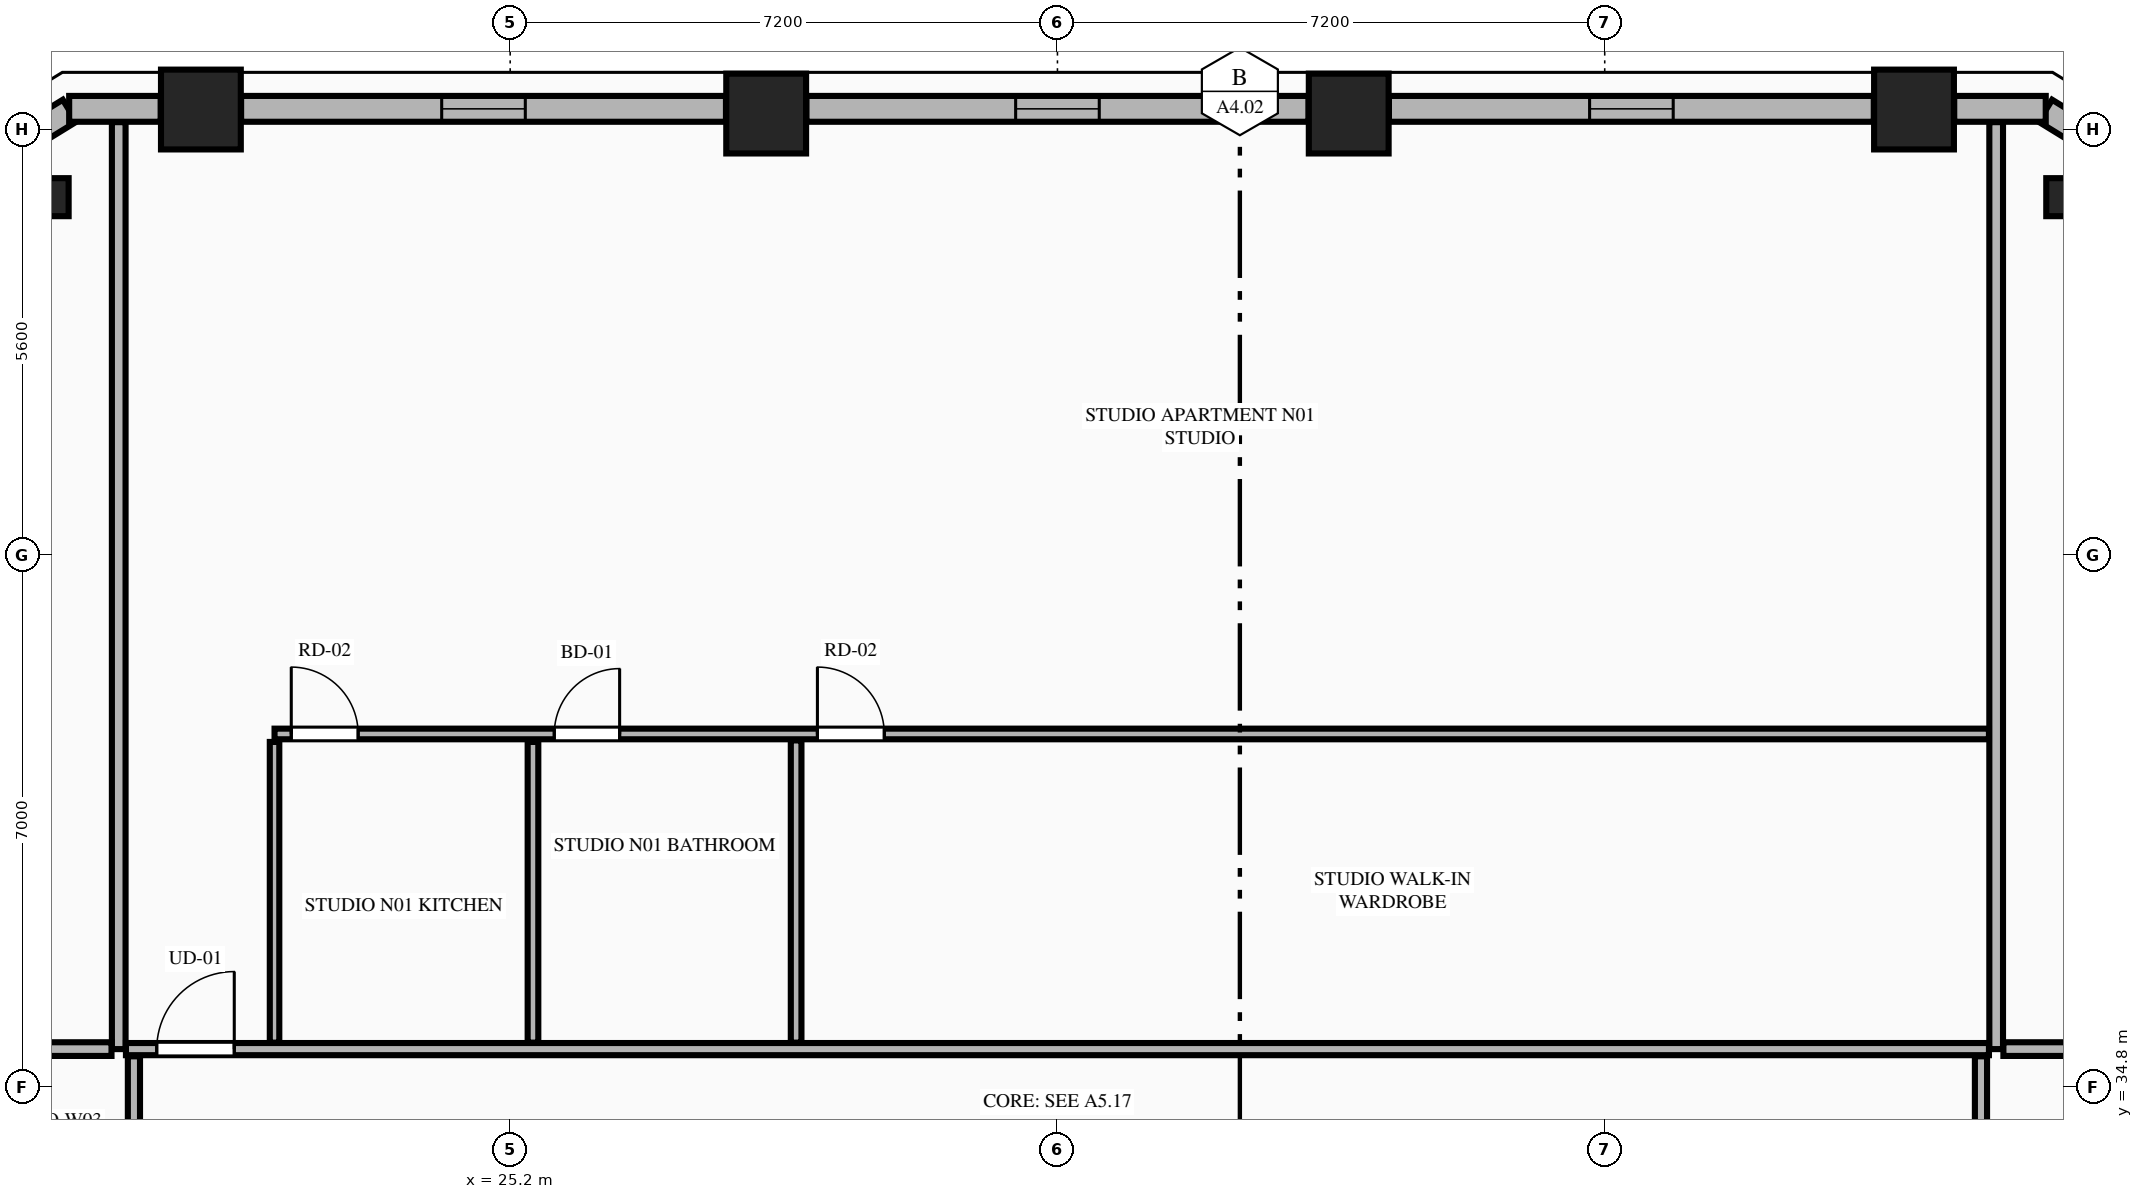
"""IFC4 building model, lengths in metres.
Left out: names, types, materials, properties, quantities, classifications, styles, units other than length and angle.
Written with IfcOpenShell. Run it as: python <this file> out.ifc"""

import sys

from ifc_helpers import new_model, si_unit, direction, frame, frame_2d, origin, origin_2d, place, context, subcontext, project, spatial, rectangle, extrude, element, fill, save


model = new_model("IFC4")
c1 = context("Model", 3, precision=1e-05, world=origin(), true_north=direction((0.0, 1.0)))
c2 = subcontext(c1, "Body", "Model", "MODEL_VIEW")
j1 = project(units=[si_unit("LENGTHUNIT", "METRE"), si_unit("PLANEANGLEUNIT", "RADIAN")], contexts=[c1])
p1 = place(None, origin())
s1 = spatial("IfcSite", under=j1, at=p1, CompositionType="ELEMENT")
p2 = place(p1, origin())
s2 = spatial("IfcBuilding", under=s1, at=p2, CompositionType="ELEMENT")
p3 = place(p2, frame((0.0, 0.0, 123.25)))
s3 = spatial("IfcBuildingStorey", under=s2, at=p3, CompositionType="ELEMENT", Elevation=123.25)
for number, where, z_axis, x_axis in (
    (1, (43.669, 47.661, 0.0), (0.0, 0.0, 1.0), (1.0, 0.0, 0.0)),
    (2, (36.232, 47.608, 0.0), (0.0, 0.0, 1.0), (1.0, 0.0, 0.0)),
    (3, (28.568, 47.608, 0.0), (0.0, 0.0, 1.0), (1.0, 0.0, 0.0)),
    (4, (21.131, 47.661, 0.0), (0.0, 0.0, 1.0), (1.0, 0.0, 0.0)),
):
    element("IfcColumn", number, at=place(p3, frame(where, z_axis=z_axis, x_axis=x_axis)), inside=s3, PredefinedType="COLUMN", context=c2, shape_type="SweptSolid", body=[
        extrude(rectangle(XDim=1.05, YDim=1.05, at=origin_2d()), origin(), (0.0, 0.0, 1.0), 3.55),
    ])
for number, where, z_axis, x_axis in (
    (5, (45.659, 46.508, 0.0), (0.0, 0.0, 1.0), (-0.865, 0.501, 0.0)),
    (6, (19.141, 46.508, 0.0), (0.0, 0.0, 1.0), (-0.865, -0.501, 0.0)),
):
    element("IfcColumn", number, at=place(p3, frame(where, z_axis=z_axis, x_axis=x_axis)), inside=s3, PredefinedType="PILASTER", context=c2, shape_type="SweptSolid", body=[
        extrude(rectangle(XDim=0.5, YDim=0.35, at=origin_2d()), origin(), (0.0, 0.0, 1.0), 3.55),
    ])
for number, where, z_axis, x_axis in (
    (7, (46.971, 46.677, 0.0), (0.0, 0.0, 1.0), (-0.852, 0.524, 0.0)),
    (8, (19.403, 47.645, 0.0), (0.0, 0.0, 1.0), (-0.852, -0.524, 0.0)),
):
    element("IfcWall", number, at=place(p3, frame(where, z_axis=z_axis, x_axis=x_axis)), inside=s3, PredefinedType="STANDARD", context=c2, shape_type="SweptSolid", body=[
        extrude(rectangle(XDim=1.848, YDim=0.34, at=frame_2d((0.924, 0.0))), origin(), (0.0, 0.0, 1.0), 3.34),
    ])
p4 = place(p3, frame((45.402, 47.67, 0.0), z_axis=(0.0, 0.0, 1.0), x_axis=(-1.0, 0.0, 0.0)))
e9 = element("IfcWall", 9, at=p4, inside=s3, PredefinedType="STANDARD", context=c2, shape_type="SweptSolid", body=[
    extrude(rectangle(XDim=1.204, YDim=0.34, at=frame_2d((0.602, 0.0))), origin(), (0.0, 0.0, 1.0), 3.34),
])
p5 = place(p3, frame((43.14, 47.67, 0.0), z_axis=(0.0, 0.0, 1.0), x_axis=(-1.0, 0.0, 0.0)))
e10 = element("IfcWall", 10, at=p5, inside=s3, PredefinedType="STANDARD", context=c2, shape_type="SweptSolid", body=[
    extrude(rectangle(XDim=6.379, YDim=0.34, at=frame_2d((3.189, 0.0))), origin(), (0.0, 0.0, 1.0), 2.797),
])
p6 = place(p5, frame((2.639, 0.0, 0.75)))
e11 = element("IfcOpeningElement", 11, at=p6, cuts=e10, PredefinedType="OPENING", context=c2, shape_type="SweptSolid", body=[
    extrude(rectangle(XDim=1.1, YDim=1.897, at=frame_2d((0.55, 0.948))), frame((0.0, 0.18, 0.0), z_axis=(0.0, -1.0, 0.0), x_axis=(1.0, 0.0, 0.0)), (0.0, 0.0, 1.0), 0.36),
])
p7 = place(p3, frame((35.703, 47.67, 0.0), z_axis=(0.0, 0.0, 1.0), x_axis=(-1.0, 0.0, 0.0)))
e12 = element("IfcWall", 12, at=p7, inside=s3, PredefinedType="STANDARD", context=c2, shape_type="SweptSolid", body=[
    extrude(rectangle(XDim=6.606, YDim=0.34, at=frame_2d((3.303, 0.0))), origin(), (0.0, 0.0, 1.0), 2.797),
])
p8 = place(p7, frame((2.753, 0.0, 0.75)))
e13 = element("IfcOpeningElement", 13, at=p8, cuts=e12, PredefinedType="OPENING", context=c2, shape_type="SweptSolid", body=[
    extrude(rectangle(XDim=1.1, YDim=1.897, at=frame_2d((0.55, 0.948))), frame((0.0, 0.18, 0.0), z_axis=(0.0, -1.0, 0.0), x_axis=(1.0, 0.0, 0.0)), (0.0, 0.0, 1.0), 0.36),
])
p9 = place(p3, frame((28.039, 47.67, 0.0), z_axis=(0.0, 0.0, 1.0), x_axis=(-1.0, 0.0, 0.0)))
e14 = element("IfcWall", 14, at=p9, inside=s3, PredefinedType="STANDARD", context=c2, shape_type="SweptSolid", body=[
    extrude(rectangle(XDim=6.379, YDim=0.34, at=frame_2d((3.189, 0.0))), origin(), (0.0, 0.0, 1.0), 2.797),
])
p10 = place(p9, frame((2.64, 0.0, 0.75)))
e15 = element("IfcOpeningElement", 15, at=p10, cuts=e14, PredefinedType="OPENING", context=c2, shape_type="SweptSolid", body=[
    extrude(rectangle(XDim=1.1, YDim=1.897, at=frame_2d((0.55, 0.948))), frame((0.0, 0.18, 0.0), z_axis=(0.0, -1.0, 0.0), x_axis=(1.0, 0.0, 0.0)), (0.0, 0.0, 1.0), 0.36),
])
p11 = place(p3, frame((20.602, 47.67, 0.0), z_axis=(0.0, 0.0, 1.0), x_axis=(-1.0, 0.0, 0.0)))
e16 = element("IfcWall", 16, at=p11, inside=s3, PredefinedType="STANDARD", context=c2, shape_type="SweptSolid", body=[
    extrude(rectangle(XDim=1.204, YDim=0.34, at=frame_2d((0.602, 0.0))), origin(), (0.0, 0.0, 1.0), 3.34),
])
for number, where, z_axis, x_axis in (
    (17, (20.05, 35.3, 0.0), (0.0, 0.0, 1.0), (0.0, 1.0, 0.0)),
    (18, (44.75, 35.3, 0.0), (0.0, 0.0, 1.0), (0.0, 1.0, 0.0)),
):
    element("IfcWall", number, at=place(p3, frame(where, z_axis=z_axis, x_axis=x_axis)), inside=s3, PredefinedType="PARTITIONING", context=c2, shape_type="SweptSolid", body=[
        extrude(rectangle(XDim=12.195, YDim=0.18, at=frame_2d((6.098, 0.0))), origin(), (0.0, 0.0, 1.0), 3.34),
    ])
p12 = place(p3, frame((20.145, 35.3, 0.0), z_axis=(0.0, 0.0, 1.0), x_axis=(1.0, 0.0, 0.0)))
e19 = element("IfcWall", 19, at=p12, inside=s3, PredefinedType="PARTITIONING", context=c2, shape_type="SweptSolid", body=[
    extrude(rectangle(XDim=24.51, YDim=0.16, at=frame_2d((12.255, 0.0))), origin(), (0.0, 0.0, 1.0), 3.34),
])
p13 = place(p12, frame((0.405, 0.0, 0.0)))
e20 = element("IfcOpeningElement", 20, at=p13, cuts=e19, PredefinedType="OPENING", context=c2, shape_type="SweptSolid", body=[
    extrude(rectangle(XDim=1.02, YDim=2.25, at=frame_2d((0.51, 1.125))), frame((0.0, 0.09, 0.0), z_axis=(0.0, -1.0, 0.0), x_axis=(1.0, 0.0, 0.0)), (0.0, 0.0, 1.0), 0.18),
])
p14 = place(p3, frame((22.1, 35.385, 0.0), z_axis=(0.0, 0.0, 1.0), x_axis=(0.0, 1.0, 0.0)))
e21 = element("IfcWall", 21, at=p14, inside=s3, PredefinedType="PARTITIONING", context=c2, shape_type="SweptSolid", body=[
    extrude(rectangle(XDim=3.956, YDim=0.125, at=frame_2d((1.978, 0.0))), origin(), (0.0, 0.0, 1.0), 2.722),
])
p15 = place(p3, frame((22.1, 39.446, 0.0), z_axis=(0.0, 0.0, 1.0), x_axis=(1.0, 0.0, 0.0)))
e22 = element("IfcWall", 22, at=p15, inside=s3, PredefinedType="PLUMBINGWALL", context=c2, shape_type="SweptSolid", body=[
    extrude(rectangle(XDim=22.555, YDim=0.14, at=frame_2d((11.277, 0.0))), origin(), (0.0, 0.0, 1.0), 3.34),
])
p16 = place(p15, frame((3.68, 0.0, 0.0)))
e23 = element("IfcOpeningElement", 23, at=p16, cuts=e22, PredefinedType="OPENING", context=c2, shape_type="SweptSolid", body=[
    extrude(rectangle(XDim=0.86, YDim=2.1, at=frame_2d((0.43, 1.05))), frame((0.0, 0.08, 0.0), z_axis=(0.0, -1.0, 0.0), x_axis=(1.0, 0.0, 0.0)), (0.0, 0.0, 1.0), 0.16),
])
p17 = place(p15, frame((7.142, 0.0, 0.0)))
e24 = element("IfcOpeningElement", 24, at=p17, cuts=e22, PredefinedType="OPENING", context=c2, shape_type="SweptSolid", body=[
    extrude(rectangle(XDim=0.88, YDim=2.15, at=frame_2d((0.44, 1.075))), frame((0.0, 0.08, 0.0), z_axis=(0.0, -1.0, 0.0), x_axis=(1.0, 0.0, 0.0)), (0.0, 0.0, 1.0), 0.16),
])
p18 = place(p15, frame((0.22, 0.0, 0.0)))
e25 = element("IfcOpeningElement", 25, at=p18, cuts=e22, PredefinedType="OPENING", context=c2, shape_type="SweptSolid", body=[
    extrude(rectangle(XDim=0.88, YDim=2.15, at=frame_2d((0.44, 1.075))), frame((0.0, 0.08, 0.0), z_axis=(0.0, -1.0, 0.0), x_axis=(1.0, 0.0, 0.0)), (0.0, 0.0, 1.0), 0.16),
])
p19 = place(p3, frame((25.5, 35.385, 0.0), z_axis=(0.0, 0.0, 1.0), x_axis=(0.0, 1.0, 0.0)))
e26 = element("IfcWall", 26, at=p19, inside=s3, PredefinedType="PLUMBINGWALL", context=c2, shape_type="SweptSolid", body=[
    extrude(rectangle(XDim=3.956, YDim=0.14, at=frame_2d((1.978, 0.0))), origin(), (0.0, 0.0, 1.0), 3.34),
])
p20 = place(p3, frame((28.962, 35.385, 0.0), z_axis=(0.0, 0.0, 1.0), x_axis=(0.0, 1.0, 0.0)))
e27 = element("IfcWall", 27, at=p20, inside=s3, PredefinedType="PLUMBINGWALL", context=c2, shape_type="SweptSolid", body=[
    extrude(rectangle(XDim=3.976, YDim=0.14, at=frame_2d((1.988, 0.0))), origin(), (0.0, 0.0, 1.0), 3.34),
])
p21 = place(p3, frame((12.286, 35.3, 0.0), z_axis=(0.0, 0.0, 1.0), x_axis=(1.0, 0.0, 0.0)))
e28 = element("IfcWall", 28, at=p21, inside=s3, PredefinedType="PARTITIONING", context=c2, shape_type="SweptSolid", body=[
    extrude(rectangle(XDim=7.669, YDim=0.18, at=frame_2d((3.834, 0.0))), origin(), (0.0, 0.0, 1.0), 3.34),
])
p22 = place(p3, frame((44.845, 35.3, 0.0), z_axis=(0.0, 0.0, 1.0), x_axis=(1.0, 0.0, 0.0)))
e29 = element("IfcWall", 29, at=p22, inside=s3, PredefinedType="PARTITIONING", context=c2, shape_type="SweptSolid", body=[
    extrude(rectangle(XDim=7.669, YDim=0.18, at=frame_2d((3.834, 0.0))), origin(), (0.0, 0.0, 1.0), 3.34),
])
p23 = place(p3, frame((20.25, 29.191, 0.0), z_axis=(0.0, 0.0, 1.0), x_axis=(0.0, 1.0, 0.0)))
e30 = element("IfcWall", 30, at=p23, inside=s3, PredefinedType="PARTITIONING", context=c2, shape_type="SweptSolid", body=[
    extrude(rectangle(XDim=6.014, YDim=0.16, at=frame_2d((3.007, 0.0))), origin(), (0.0, 0.0, 1.0), 3.34),
])
p24 = place(p23, frame((0.4, 0.0, 0.0)))
e31 = element("IfcOpeningElement", 31, at=p24, cuts=e30, PredefinedType="OPENING", context=c2, shape_type="SweptSolid", body=[
    extrude(rectangle(XDim=1.02, YDim=2.25, at=frame_2d((0.51, 1.125))), frame((0.0, 0.09, 0.0), z_axis=(0.0, -1.0, 0.0), x_axis=(1.0, 0.0, 0.0)), (0.0, 0.0, 1.0), 0.18),
])
p25 = place(p3, frame((44.55, 26.371, 0.0), z_axis=(0.0, 0.0, 1.0), x_axis=(0.0, 1.0, 0.0)))
e32 = element("IfcWall", 32, at=p25, inside=s3, PredefinedType="PARTITIONING", context=c2, shape_type="SweptSolid", body=[
    extrude(rectangle(XDim=8.834, YDim=0.16, at=frame_2d((4.417, 0.0))), origin(), (0.0, 0.0, 1.0), 3.34),
])
p26 = place(p25, frame((0.4, 0.0, 0.0)))
e33 = element("IfcOpeningElement", 33, at=p26, cuts=e32, PredefinedType="OPENING", context=c2, shape_type="SweptSolid", body=[
    extrude(rectangle(XDim=1.02, YDim=2.25, at=frame_2d((0.51, 1.125))), frame((0.0, 0.09, 0.0), z_axis=(0.0, -1.0, 0.0), x_axis=(1.0, 0.0, 0.0)), (0.0, 0.0, 1.0), 0.18),
])
p27 = place(p6, origin())
e34 = element("IfcWindow", 34, at=p27, inside=s3, PartitioningType="SINGLE_PANEL", PredefinedType="WINDOW", context=c2, shape_type="SweptSolid", body=[
    extrude(rectangle(XDim=1.1, YDim=1.897, at=frame_2d((0.55, 0.948))), frame((0.0, 0.03, 0.0), z_axis=(0.0, -1.0, 0.0), x_axis=(1.0, 0.0, 0.0)), (0.0, 0.0, 1.0), 0.06),
])
fill(e11, e34)
p28 = place(p8, origin())
e35 = element("IfcWindow", 35, at=p28, inside=s3, PartitioningType="SINGLE_PANEL", PredefinedType="WINDOW", context=c2, shape_type="SweptSolid", body=[
    extrude(rectangle(XDim=1.1, YDim=1.897, at=frame_2d((0.55, 0.948))), frame((0.0, 0.03, 0.0), z_axis=(0.0, -1.0, 0.0), x_axis=(1.0, 0.0, 0.0)), (0.0, 0.0, 1.0), 0.06),
])
fill(e13, e35)
p29 = place(p10, origin())
e36 = element("IfcWindow", 36, at=p29, inside=s3, PartitioningType="SINGLE_PANEL", PredefinedType="WINDOW", context=c2, shape_type="SweptSolid", body=[
    extrude(rectangle(XDim=1.1, YDim=1.897, at=frame_2d((0.55, 0.948))), frame((0.0, 0.03, 0.0), z_axis=(0.0, -1.0, 0.0), x_axis=(1.0, 0.0, 0.0)), (0.0, 0.0, 1.0), 0.06),
])
fill(e15, e36)
p30 = place(p16, origin())
e37 = element("IfcDoor", 37, at=p30, inside=s3, OperationType="SINGLE_SWING_RIGHT", PredefinedType="DOOR", context=c2, shape_type="SweptSolid", body=[
    extrude(rectangle(XDim=0.86, YDim=2.1, at=frame_2d((0.43, 1.05))), frame((0.0, 0.025, 0.0), z_axis=(0.0, -1.0, 0.0), x_axis=(1.0, 0.0, 0.0)), (0.0, 0.0, 1.0), 0.05),
])
fill(e23, e37)
p31 = place(p17, origin())
e38 = element("IfcDoor", 38, at=p31, inside=s3, OperationType="SINGLE_SWING_LEFT", PredefinedType="DOOR", context=c2, shape_type="SweptSolid", body=[
    extrude(rectangle(XDim=0.88, YDim=2.15, at=frame_2d((0.44, 1.075))), frame((0.0, 0.025, 0.0), z_axis=(0.0, -1.0, 0.0), x_axis=(1.0, 0.0, 0.0)), (0.0, 0.0, 1.0), 0.05),
])
fill(e24, e38)
p32 = place(p13, origin())
e39 = element("IfcDoor", 39, at=p32, inside=s3, OperationType="SINGLE_SWING_RIGHT", PredefinedType="DOOR", context=c2, shape_type="SweptSolid", body=[
    extrude(rectangle(XDim=1.02, YDim=2.25, at=frame_2d((0.51, 1.125))), frame((0.0, 0.025, 0.0), z_axis=(0.0, -1.0, 0.0), x_axis=(1.0, 0.0, 0.0)), (0.0, 0.0, 1.0), 0.05),
])
fill(e20, e39)
p33 = place(p18, origin())
e40 = element("IfcDoor", 40, at=p33, inside=s3, OperationType="SINGLE_SWING_LEFT", PredefinedType="DOOR", context=c2, shape_type="SweptSolid", body=[
    extrude(rectangle(XDim=0.88, YDim=2.15, at=frame_2d((0.44, 1.075))), frame((0.0, 0.025, 0.0), z_axis=(0.0, -1.0, 0.0), x_axis=(1.0, 0.0, 0.0)), (0.0, 0.0, 1.0), 0.05),
])
fill(e25, e40)
save(model, sys.argv[1])
